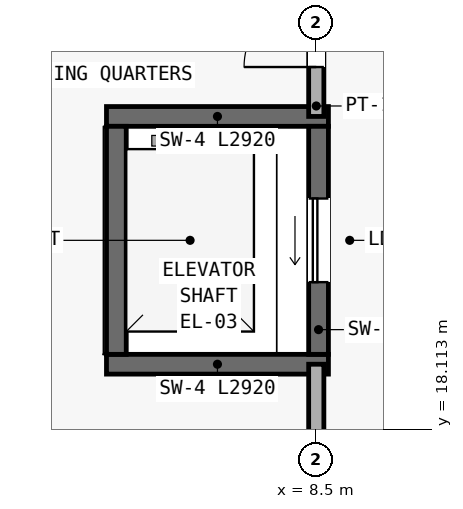
"""IFC4 building model, lengths in metres.
Left out: names, types, materials, properties, quantities, classifications, styles, units other than length and angle.
Written with IfcOpenShell. Run it as: python <this file> out.ifc"""

import sys

from ifc_helpers import new_model, si_unit, direction, frame, frame_2d, origin, place, context, subcontext, project, spatial, rectangle, extrude, element, fill, save


model = new_model("IFC4")
c1 = context("Model", 3, precision=1e-05, world=origin(), true_north=direction((0.0, 1.0)))
c2 = subcontext(c1, "Body", "Model", "MODEL_VIEW")
j1 = project(units=[si_unit("LENGTHUNIT", "METRE"), si_unit("PLANEANGLEUNIT", "RADIAN")], contexts=[c1])
p1 = place(None, origin())
s1 = spatial("IfcSite", under=j1, at=p1, CompositionType="ELEMENT")
p2 = place(p1, origin())
s2 = spatial("IfcBuilding", under=s1, at=p2, CompositionType="ELEMENT")
p3 = place(p2, frame((0.0, 0.0, 9.3)))
s3 = spatial("IfcBuildingStorey", under=s2, at=p3, CompositionType="ELEMENT", Elevation=9.3)
for number, where, z_axis, x_axis in (
    (1, (5.74, 18.97, 0.0), (0.0, 0.0, 1.0), (1.0, 0.0, 0.0)),
    (2, (8.66, 22.23, 0.0), (0.0, 0.0, 1.0), (-1.0, 0.0, 0.0)),
):
    element("IfcWall", number, at=place(p3, frame(where, z_axis=z_axis, x_axis=x_axis)), inside=s3, PredefinedType="SHEAR", context=c2, shape_type="SweptSolid", body=[
        extrude(rectangle(XDim=2.92, YDim=0.26, at=frame_2d((1.46, 0.0))), origin(), (0.0, 0.0, 1.0), 3.2),
    ])
p4 = place(p3, frame((5.87, 22.1, 0.0), z_axis=(0.0, 0.0, 1.0), x_axis=(0.0, -1.0, 0.0)))
e3 = element("IfcWall", 3, at=p4, inside=s3, PredefinedType="SHEAR", context=c2, shape_type="SweptSolid", body=[
    extrude(rectangle(XDim=3.0, YDim=0.26, at=frame_2d((1.5, 0.0))), origin(), (0.0, 0.0, 1.0), 3.2),
])
p5 = place(p3, frame((8.53, 19.1, 0.0), z_axis=(0.0, 0.0, 1.0), x_axis=(0.0, 1.0, 0.0)))
e4 = element("IfcWall", 4, at=p5, inside=s3, PredefinedType="SHEAR", context=c2, shape_type="SweptSolid", body=[
    extrude(rectangle(XDim=3.0, YDim=0.26, at=frame_2d((1.5, 0.0))), origin(), (0.0, 0.0, 1.0), 3.2),
])
p6 = place(p5, frame((0.95, 0.0, 0.0)))
e5 = element("IfcOpeningElement", 5, at=p6, cuts=e4, PredefinedType="OPENING", context=c2, shape_type="SweptSolid", body=[
    extrude(rectangle(XDim=1.1, YDim=2.15, at=frame_2d((0.55, 1.075))), frame((0.0, 0.14, 0.0), z_axis=(0.0, -1.0, 0.0), x_axis=(1.0, 0.0, 0.0)), (0.0, 0.0, 1.0), 0.28),
])
p7 = place(p3, frame((8.5, 13.94, 0.0), z_axis=(0.0, 0.0, 1.0), x_axis=(0.0, 1.0, 0.0)))
e6 = element("IfcWall", 6, at=p7, inside=s3, PredefinedType="PARTITIONING", context=c2, shape_type="SweptSolid", body=[
    extrude(rectangle(XDim=5.03, YDim=0.2, at=frame_2d((2.515, 0.0))), origin(), (0.0, 0.0, 1.0), 2.7),
])
p8 = place(p7, frame((1.35, 0.0, 0.0)))
e7 = element("IfcOpeningElement", 7, at=p8, cuts=e6, PredefinedType="OPENING", context=c2, shape_type="SweptSolid", body=[
    extrude(rectangle(XDim=0.98, YDim=2.12, at=frame_2d((0.49, 1.06))), frame((0.0, 0.11, 0.0), z_axis=(0.0, -1.0, 0.0), x_axis=(1.0, 0.0, 0.0)), (0.0, 0.0, 1.0), 0.22),
])
p9 = place(p3, frame((8.5, 22.23, 0.0), z_axis=(0.0, 0.0, 1.0), x_axis=(0.0, 1.0, 0.0)))
e8 = element("IfcWall", 8, at=p9, inside=s3, PredefinedType="PARTITIONING", context=c2, shape_type="SweptSolid", body=[
    extrude(rectangle(XDim=2.23, YDim=0.2, at=frame_2d((1.115, 0.0))), origin(), (0.0, 0.0, 1.0), 2.7),
])
p10 = place(p9, frame((0.65, 0.0, 0.0)))
e9 = element("IfcOpeningElement", 9, at=p10, cuts=e8, PredefinedType="OPENING", context=c2, shape_type="SweptSolid", body=[
    extrude(rectangle(XDim=0.95, YDim=2.1, at=frame_2d((0.475, 1.05))), frame((0.0, 0.11, 0.0), z_axis=(0.0, -1.0, 0.0), x_axis=(1.0, 0.0, 0.0)), (0.0, 0.0, 1.0), 0.22),
])
p11 = place(p6, origin())
e10 = element("IfcDoor", 10, at=p11, inside=s3, OperationType="SLIDING_TO_LEFT", PredefinedType="DOOR", context=c2, shape_type="SweptSolid", body=[
    extrude(rectangle(XDim=1.1, YDim=2.15, at=frame_2d((0.55, 1.075))), frame((0.0, 0.025, 0.0), z_axis=(0.0, -1.0, 0.0), x_axis=(1.0, 0.0, 0.0)), (0.0, 0.0, 1.0), 0.05),
])
fill(e5, e10)
p12 = place(p10, origin())
e11 = element("IfcDoor", 11, at=p12, inside=s3, OperationType="SINGLE_SWING_LEFT", PredefinedType="DOOR", context=c2, shape_type="SweptSolid", body=[
    extrude(rectangle(XDim=0.95, YDim=2.1, at=frame_2d((0.475, 1.05))), frame((0.0, 0.025, 0.0), z_axis=(0.0, -1.0, 0.0), x_axis=(1.0, 0.0, 0.0)), (0.0, 0.0, 1.0), 0.05),
])
fill(e9, e11)
save(model, sys.argv[1])
